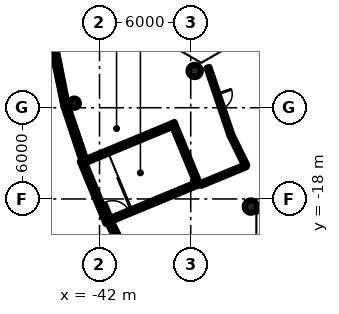
"""IFC4 building model, lengths in metres.
Left out: names, types, materials, properties, quantities, classifications, styles, units other than length and angle.
Written with IfcOpenShell. Run it as: python <this file> out.ifc"""

import sys

from ifc_helpers import new_model, si_unit, direction, frame, frame_2d, origin, origin_2d, place, context, subcontext, project, spatial, rectangle, hollow_circle, extrude, element, fill, save


model = new_model("IFC4")
c1 = context("Model", 3, precision=1e-05, world=origin(), true_north=direction((0.0, 1.0)))
c2 = subcontext(c1, "Body", "Model", "MODEL_VIEW")
j1 = project(units=[si_unit("LENGTHUNIT", "METRE"), si_unit("PLANEANGLEUNIT", "RADIAN")], contexts=[c1])
p1 = place(None, origin())
s1 = spatial("IfcSite", under=j1, at=p1, CompositionType="ELEMENT")
p2 = place(p1, origin())
s2 = spatial("IfcBuilding", under=s1, at=p2, CompositionType="ELEMENT")
p3 = place(p2, frame((0.0, 0.0, 5.4)))
s3 = spatial("IfcBuildingStorey", under=s2, at=p3, CompositionType="ELEMENT", Elevation=5.4)
for number, where, z_axis, x_axis in (
    (1, (-35.739, -9.576, 0.0), (0.0, 0.0, 1.0), (1.0, 0.0, 0.0)),
    (2, (-32.043, -18.5, 0.0), (0.0, 0.0, 1.0), (1.0, 0.0, 0.0)),
):
    element("IfcColumn", number, at=place(p3, frame(where, z_axis=z_axis, x_axis=x_axis)), inside=s3, PredefinedType="COLUMN", context=c2, shape_type="SweptSolid", body=[
        extrude(hollow_circle(Radius=0.406, WallThickness=0.03, at=origin_2d()), origin(), (0.0, 0.0, 1.0), 4.2),
    ])
p4 = place(p3, frame((-43.66, -11.698, 0.0), z_axis=(0.0, 0.0, 1.0), x_axis=(1.0, 0.0, 0.0)))
e3 = element("IfcColumn", 3, at=p4, inside=s3, PredefinedType="COLUMN", context=c2, shape_type="SweptSolid", body=[
    extrude(hollow_circle(Radius=0.305, WallThickness=0.025, at=origin_2d()), origin(), (0.0, 0.0, 1.0), 4.2),
])
p5 = place(p3, frame((-45.408, -5.978, 0.0), z_axis=(0.0, 0.0, 1.0), x_axis=(0.195112945602, -0.980780780021, 0.0)))
e4 = element("IfcWall", 4, at=p5, inside=s3, PredefinedType="SOLIDWALL", context=c2, shape_type="SweptSolid", body=[
    extrude(rectangle(XDim=5.991, YDim=0.3, at=frame_2d((2.996, 0.0))), origin(), (0.0, 0.0, 1.0), 3.7),
])
p6 = place(p5, frame((1.495, 0.0, 1.0)))
e5 = element("IfcOpeningElement", 5, at=p6, cuts=e4, PredefinedType="OPENING", context=c2, shape_type="SweptSolid", body=[
    extrude(rectangle(XDim=3.0, YDim=2.0, at=frame_2d((1.5, 1.0))), frame((0.0, 0.16, 0.0), z_axis=(0.0, -1.0, 0.0), x_axis=(1.0, 0.0, 0.0)), (0.0, 0.0, 1.0), 0.32),
])
p7 = place(p3, frame((-44.239, -11.854, 0.0), z_axis=(0.0, 0.0, 1.0), x_axis=(0.321481387979, -0.946915897629, 0.0)))
e6 = element("IfcWall", 6, at=p7, inside=s3, PredefinedType="SOLIDWALL", context=c2, shape_type="SweptSolid", body=[
    extrude(rectangle(XDim=3.761, YDim=0.3, at=frame_2d((1.88, 0.0))), origin(), (0.0, 0.0, 1.0), 3.7),
])
p8 = place(p3, frame((-41.327, -19.527, 0.0), z_axis=(0.0, 0.0, 1.0), x_axis=(0.44219447383, -0.896919197762, 0.0)))
e7 = element("IfcWall", 7, at=p8, inside=s3, PredefinedType="SOLIDWALL", context=c2, shape_type="SweptSolid", body=[
    extrude(rectangle(XDim=3.76, YDim=0.3, at=frame_2d((1.88, 0.0))), origin(), (0.0, 0.0, 1.0), 3.7),
])
p9 = place(p3, frame((-41.372, -19.41, 0.0), z_axis=(0.0, 0.0, 1.0), x_axis=(0.923886743203, 0.382666023753, 0.0)))
e8 = element("IfcWall", 8, at=p9, inside=s3, PredefinedType="SHEAR", context=c2, shape_type="SweptSolid", body=[
    extrude(rectangle(XDim=6.45, YDim=0.25, at=frame_2d((3.225, 0.0))), origin(), (0.0, 0.0, 1.0), 4.2),
])
p10 = place(p9, frame((0.25, 0.0, 0.0)))
e9 = element("IfcOpeningElement", 9, at=p10, cuts=e8, PredefinedType="OPENING", context=c2, shape_type="SweptSolid", body=[
    extrude(rectangle(XDim=1.2, YDim=2.3, at=frame_2d((0.6, 1.15))), frame((0.0, 0.135, 0.0), z_axis=(0.0, -1.0, 0.0), x_axis=(1.0, 0.0, 0.0)), (0.0, 0.0, 1.0), 0.27),
])
p11 = place(p3, frame((-37.02, -13.061, 0.0), z_axis=(0.0, 0.0, 1.0), x_axis=(-0.923881200375, -0.38267940576, 0.0)))
e10 = element("IfcWall", 10, at=p11, inside=s3, PredefinedType="SHEAR", context=c2, shape_type="SweptSolid", body=[
    extrude(rectangle(XDim=6.45, YDim=0.25, at=frame_2d((3.225, 0.0))), origin(), (0.0, 0.0, 1.0), 4.2),
])
p12 = place(p3, frame((-37.183, -12.993, 0.0), z_axis=(0.0, 0.0, 1.0), x_axis=(0.382713570591, -0.923867048273, 0.0)))
e11 = element("IfcWall", 11, at=p12, inside=s3, PredefinedType="SHEAR", context=c2, shape_type="SweptSolid", body=[
    extrude(rectangle(XDim=4.45, YDim=0.25, at=frame_2d((2.225, 0.0))), origin(), (0.0, 0.0, 1.0), 4.2),
])
p13 = place(p3, frame((-43.165, -15.471, 0.0), z_axis=(0.0, 0.0, 1.0), x_axis=(0.382666743194, -0.923886445216, 0.0)))
e12 = element("IfcWall", 12, at=p13, inside=s3, PredefinedType="SHEAR", context=c2, shape_type="SweptSolid", body=[
    extrude(rectangle(XDim=4.45, YDim=0.3, at=frame_2d((2.225, 0.0))), origin(), (0.0, 0.0, 1.0), 4.2),
])
p14 = place(p3, frame((-34.87, -9.343, 0.0), z_axis=(0.0, 0.0, 1.0), x_axis=(0.321449493775, -0.946926725229, 0.0)))
e13 = element("IfcWall", 13, at=p14, inside=s3, PredefinedType="PARTITIONING", context=c2, shape_type="SweptSolid", body=[
    extrude(rectangle(XDim=4.723, YDim=0.2, at=frame_2d((2.361, 0.0))), origin(), (0.0, 0.0, 1.0), 3.7),
])
p15 = place(p14, frame((1.861, 0.0, 0.0)))
e14 = element("IfcOpeningElement", 14, at=p15, cuts=e13, PredefinedType="OPENING", context=c2, shape_type="SweptSolid", body=[
    extrude(rectangle(XDim=1.0, YDim=2.3, at=frame_2d((0.5, 1.15))), frame((0.0, 0.11, 0.0), z_axis=(0.0, -1.0, 0.0), x_axis=(1.0, 0.0, 0.0)), (0.0, 0.0, 1.0), 0.22),
])
p16 = place(p3, frame((-33.352, -13.815, 0.0), z_axis=(0.0, 0.0, 1.0), x_axis=(0.442214065645, -0.896909538441, 0.0)))
e15 = element("IfcWall", 15, at=p16, inside=s3, PredefinedType="PARTITIONING", context=c2, shape_type="SweptSolid", body=[
    extrude(rectangle(XDim=2.23, YDim=0.2, at=frame_2d((1.115, 0.0))), origin(), (0.0, 0.0, 1.0), 3.7),
])
p17 = place(p3, frame((-35.346, -17.049, 0.0), z_axis=(0.0, 0.0, 1.0), x_axis=(0.923903368196, 0.382625882863, 0.0)))
e16 = element("IfcWall", 16, at=p17, inside=s3, PredefinedType="PARTITIONING", context=c2, shape_type="SweptSolid", body=[
    extrude(rectangle(XDim=3.225, YDim=0.2, at=frame_2d((1.613, 0.0))), origin(), (0.0, 0.0, 1.0), 3.7),
])
p18 = place(p6, origin())
e17 = element("IfcWindow", 17, at=p18, inside=s3, PartitioningType="SINGLE_PANEL", PredefinedType="WINDOW", context=c2, shape_type="SweptSolid", body=[
    extrude(rectangle(XDim=3.0, YDim=2.0, at=frame_2d((1.5, 1.0))), frame((0.0, 0.03, 0.0), z_axis=(0.0, -1.0, 0.0), x_axis=(1.0, 0.0, 0.0)), (0.0, 0.0, 1.0), 0.06),
])
fill(e5, e17)
p19 = place(p10, origin())
e18 = element("IfcDoor", 18, at=p19, inside=s3, OperationType="SINGLE_SWING_RIGHT", PredefinedType="DOOR", context=c2, shape_type="SweptSolid", body=[
    extrude(rectangle(XDim=1.2, YDim=2.3, at=frame_2d((0.6, 1.15))), frame((0.0, 0.025, 0.0), z_axis=(0.0, -1.0, 0.0), x_axis=(1.0, 0.0, 0.0)), (0.0, 0.0, 1.0), 0.05),
])
fill(e9, e18)
p20 = place(p15, origin())
e19 = element("IfcDoor", 19, at=p20, inside=s3, OperationType="SINGLE_SWING_RIGHT", PredefinedType="DOOR", context=c2, shape_type="SweptSolid", body=[
    extrude(rectangle(XDim=1.0, YDim=2.3, at=frame_2d((0.5, 1.15))), frame((0.0, 0.025, 0.0), z_axis=(0.0, -1.0, 0.0), x_axis=(1.0, 0.0, 0.0)), (0.0, 0.0, 1.0), 0.05),
])
fill(e14, e19)
save(model, sys.argv[1])
